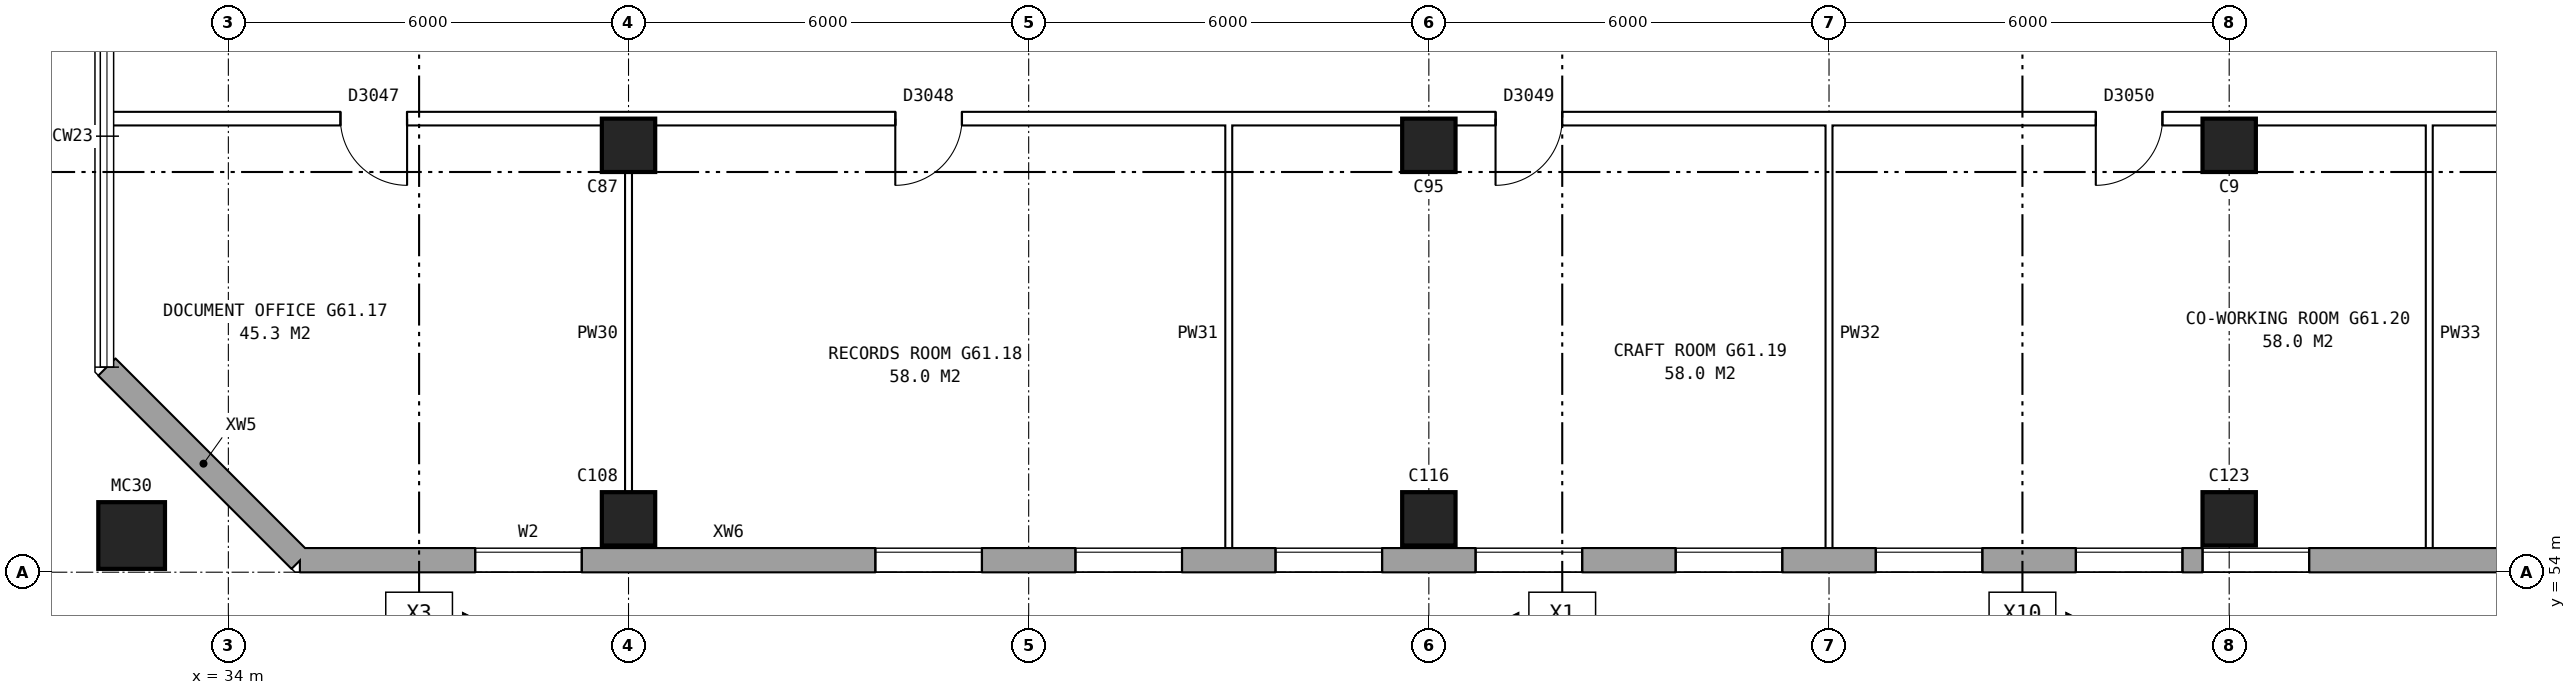
"""IFC4 building model, lengths in metres.
Left out: names, types, materials, properties, quantities, classifications, styles, units other than length and angle.
Written with IfcOpenShell. Run it as: python <this file> out.ifc"""

import sys

from ifc_helpers import new_model, si_unit, direction, frame, frame_2d, origin, origin_2d, place, context, subcontext, project, spatial, rectangle, hollow_rectangle, extrude, element, fill, save


model = new_model("IFC4")
c1 = context("Model", 3, precision=1e-05, world=origin(), true_north=direction((0.0, 1.0)))
c2 = subcontext(c1, "Body", "Model", "MODEL_VIEW")
j1 = project(units=[si_unit("LENGTHUNIT", "METRE"), si_unit("PLANEANGLEUNIT", "RADIAN")], contexts=[c1])
p1 = place(None, origin())
s1 = spatial("IfcSite", under=j1, at=p1, CompositionType="ELEMENT")
p2 = place(p1, origin())
s2 = spatial("IfcBuilding", under=s1, at=p2, CompositionType="ELEMENT")
p3 = place(p2, frame((0.0, 0.0, 215.2)))
s3 = spatial("IfcBuildingStorey", under=s2, at=p3, CompositionType="ELEMENT", Elevation=215.2)
for number, where, z_axis, x_axis in (
    (1, (40.0, 54.8, 0.0), (0.0, 0.0, 1.0), (1.0, 0.0, 0.0)),
    (2, (40.0, 60.4, 0.0), (0.0, 0.0, 1.0), (1.0, 0.0, 0.0)),
    (3, (52.0, 54.8, 0.0), (0.0, 0.0, 1.0), (1.0, 0.0, 0.0)),
    (4, (52.0, 60.4, 0.0), (0.0, 0.0, 1.0), (1.0, 0.0, 0.0)),
    (5, (64.0, 54.8, 0.0), (0.0, 0.0, 1.0), (1.0, 0.0, 0.0)),
    (6, (64.0, 60.4, 0.0), (0.0, 0.0, 1.0), (1.0, 0.0, 0.0)),
):
    element("IfcColumn", number, at=place(p3, frame(where, z_axis=z_axis, x_axis=x_axis)), inside=s3, PredefinedType="COLUMN", context=c2, shape_type="SweptSolid", body=[
        extrude(rectangle(XDim=0.8, YDim=0.8, at=origin_2d()), origin(), (0.0, 0.0, 1.0), 5.6),
    ])
p4 = place(p3, frame((32.55, 54.55, 0.0), z_axis=(0.0, 0.0, 1.0), x_axis=(1.0, 0.0, 0.0)))
e7 = element("IfcColumn", 7, at=p4, inside=s3, PredefinedType="COLUMN", context=c2, shape_type="SweptSolid", body=[
    extrude(hollow_rectangle(XDim=1.0, YDim=1.0, WallThickness=0.055, at=origin_2d()), origin(), (0.0, 0.0, 1.0), 6.2),
])
p5 = place(p3, frame((32.18, 57.075, 0.0), z_axis=(0.0, 0.0, 1.0), x_axis=(0.707106781187, -0.707106781187, 0.0)))
e8 = element("IfcWall", 8, at=p5, inside=s3, PredefinedType="STANDARD", context=c2, shape_type="SweptSolid", body=[
    extrude(rectangle(XDim=4.094, YDim=0.36, at=frame_2d((2.047, 0.0))), origin(), (0.0, 0.0, 1.0), 5.6),
])
p6 = place(p3, frame((35.075, 54.18, 0.0), z_axis=(0.0, 0.0, 1.0), x_axis=(1.0, 0.0, 0.0)))
e9 = element("IfcWall", 9, at=p6, inside=s3, PredefinedType="STANDARD", context=c2, shape_type="SweptSolid", body=[
    extrude(rectangle(XDim=39.875, YDim=0.36, at=frame_2d((19.938, 0.0))), origin(), (0.0, 0.0, 1.0), 5.6),
])
p7 = place(p6, frame((2.625, 0.0, 0.15)))
e10 = element("IfcOpeningElement", 10, at=p7, cuts=e9, PredefinedType="OPENING", context=c2, shape_type="SweptSolid", body=[
    extrude(rectangle(XDim=1.6, YDim=2.4, at=frame_2d((0.8, 1.2))), frame((0.0, 0.19, 0.0), z_axis=(0.0, -1.0, 0.0), x_axis=(1.0, 0.0, 0.0)), (0.0, 0.0, 1.0), 0.38),
])
p8 = place(p6, frame((8.625, 0.0, 0.15)))
e11 = element("IfcOpeningElement", 11, at=p8, cuts=e9, PredefinedType="OPENING", context=c2, shape_type="SweptSolid", body=[
    extrude(rectangle(XDim=1.6, YDim=2.4, at=frame_2d((0.8, 1.2))), frame((0.0, 0.19, 0.0), z_axis=(0.0, -1.0, 0.0), x_axis=(1.0, 0.0, 0.0)), (0.0, 0.0, 1.0), 0.38),
])
p9 = place(p6, frame((11.625, 0.0, 0.15)))
e12 = element("IfcOpeningElement", 12, at=p9, cuts=e9, PredefinedType="OPENING", context=c2, shape_type="SweptSolid", body=[
    extrude(rectangle(XDim=1.6, YDim=2.4, at=frame_2d((0.8, 1.2))), frame((0.0, 0.19, 0.0), z_axis=(0.0, -1.0, 0.0), x_axis=(1.0, 0.0, 0.0)), (0.0, 0.0, 1.0), 0.38),
])
p10 = place(p6, frame((14.625, 0.0, 0.15)))
e13 = element("IfcOpeningElement", 13, at=p10, cuts=e9, PredefinedType="OPENING", context=c2, shape_type="SweptSolid", body=[
    extrude(rectangle(XDim=1.6, YDim=2.4, at=frame_2d((0.8, 1.2))), frame((0.0, 0.19, 0.0), z_axis=(0.0, -1.0, 0.0), x_axis=(1.0, 0.0, 0.0)), (0.0, 0.0, 1.0), 0.38),
])
p11 = place(p6, frame((17.625, 0.0, 0.15)))
e14 = element("IfcOpeningElement", 14, at=p11, cuts=e9, PredefinedType="OPENING", context=c2, shape_type="SweptSolid", body=[
    extrude(rectangle(XDim=1.6, YDim=2.4, at=frame_2d((0.8, 1.2))), frame((0.0, 0.19, 0.0), z_axis=(0.0, -1.0, 0.0), x_axis=(1.0, 0.0, 0.0)), (0.0, 0.0, 1.0), 0.38),
])
p12 = place(p6, frame((20.625, 0.0, 0.15)))
e15 = element("IfcOpeningElement", 15, at=p12, cuts=e9, PredefinedType="OPENING", context=c2, shape_type="SweptSolid", body=[
    extrude(rectangle(XDim=1.6, YDim=2.4, at=frame_2d((0.8, 1.2))), frame((0.0, 0.19, 0.0), z_axis=(0.0, -1.0, 0.0), x_axis=(1.0, 0.0, 0.0)), (0.0, 0.0, 1.0), 0.38),
])
p13 = place(p6, frame((23.625, 0.0, 0.15)))
e16 = element("IfcOpeningElement", 16, at=p13, cuts=e9, PredefinedType="OPENING", context=c2, shape_type="SweptSolid", body=[
    extrude(rectangle(XDim=1.6, YDim=2.4, at=frame_2d((0.8, 1.2))), frame((0.0, 0.19, 0.0), z_axis=(0.0, -1.0, 0.0), x_axis=(1.0, 0.0, 0.0)), (0.0, 0.0, 1.0), 0.38),
])
p14 = place(p6, frame((26.625, 0.0, 0.15)))
e17 = element("IfcOpeningElement", 17, at=p14, cuts=e9, PredefinedType="OPENING", context=c2, shape_type="SweptSolid", body=[
    extrude(rectangle(XDim=1.6, YDim=2.4, at=frame_2d((0.8, 1.2))), frame((0.0, 0.19, 0.0), z_axis=(0.0, -1.0, 0.0), x_axis=(1.0, 0.0, 0.0)), (0.0, 0.0, 1.0), 0.38),
])
p15 = place(p6, frame((28.525, 0.0, 0.15)))
e18 = element("IfcOpeningElement", 18, at=p15, cuts=e9, PredefinedType="OPENING", context=c2, shape_type="SweptSolid", body=[
    extrude(rectangle(XDim=1.6, YDim=2.4, at=frame_2d((0.8, 1.2))), frame((0.0, 0.19, 0.0), z_axis=(0.0, -1.0, 0.0), x_axis=(1.0, 0.0, 0.0)), (0.0, 0.0, 1.0), 0.38),
])
p16 = place(p6, frame((32.975, 0.0, 0.15)))
e19 = element("IfcOpeningElement", 19, at=p16, cuts=e9, PredefinedType="OPENING", context=c2, shape_type="SweptSolid", body=[
    extrude(rectangle(XDim=0.9, YDim=2.4, at=frame_2d((0.45, 1.2))), frame((0.0, 0.19, 0.0), z_axis=(0.0, -1.0, 0.0), x_axis=(1.0, 0.0, 0.0)), (0.0, 0.0, 1.0), 0.38),
])
p17 = place(p6, frame((35.625, 0.0, 0.15)))
e20 = element("IfcOpeningElement", 20, at=p17, cuts=e9, PredefinedType="OPENING", context=c2, shape_type="SweptSolid", body=[
    extrude(rectangle(XDim=1.6, YDim=2.4, at=frame_2d((0.8, 1.2))), frame((0.0, 0.19, 0.0), z_axis=(0.0, -1.0, 0.0), x_axis=(1.0, 0.0, 0.0)), (0.0, 0.0, 1.0), 0.38),
])
p18 = place(p6, frame((34.175, 0.0, 0.15)))
e21 = element("IfcOpeningElement", 21, at=p18, cuts=e9, PredefinedType="OPENING", context=c2, shape_type="SweptSolid", body=[
    extrude(rectangle(XDim=0.9, YDim=2.4, at=frame_2d((0.45, 1.2))), frame((0.0, 0.19, 0.0), z_axis=(0.0, -1.0, 0.0), x_axis=(1.0, 0.0, 0.0)), (0.0, 0.0, 1.0), 0.38),
])
p19 = place(p3, frame((32.24, 60.8, 0.0), z_axis=(0.0, 0.0, 1.0), x_axis=(1.0, 0.0, 0.0)))
e22 = element("IfcWall", 22, at=p19, inside=s3, PredefinedType="PARTITIONING", context=c2, shape_type="SweptSolid", body=[
    extrude(rectangle(XDim=136.52, YDim=0.2, at=frame_2d((68.26, 0.0))), origin(), (0.0, 0.0, 1.0), 5.6),
])
p20 = place(p19, frame((3.44, 0.0, 0.0)))
e23 = element("IfcOpeningElement", 23, at=p20, cuts=e22, PredefinedType="OPENING", context=c2, shape_type="SweptSolid", body=[
    extrude(rectangle(XDim=1.0, YDim=2.1, at=frame_2d((0.5, 1.05))), frame((0.0, 0.11, 0.0), z_axis=(0.0, -1.0, 0.0), x_axis=(1.0, 0.0, 0.0)), (0.0, 0.0, 1.0), 0.22),
])
p21 = place(p19, frame((11.76, 0.0, 0.0)))
e24 = element("IfcOpeningElement", 24, at=p21, cuts=e22, PredefinedType="OPENING", context=c2, shape_type="SweptSolid", body=[
    extrude(rectangle(XDim=1.0, YDim=2.1, at=frame_2d((0.5, 1.05))), frame((0.0, 0.11, 0.0), z_axis=(0.0, -1.0, 0.0), x_axis=(1.0, 0.0, 0.0)), (0.0, 0.0, 1.0), 0.22),
])
p22 = place(p19, frame((20.76, 0.0, 0.0)))
e25 = element("IfcOpeningElement", 25, at=p22, cuts=e22, PredefinedType="OPENING", context=c2, shape_type="SweptSolid", body=[
    extrude(rectangle(XDim=1.0, YDim=2.1, at=frame_2d((0.5, 1.05))), frame((0.0, 0.11, 0.0), z_axis=(0.0, -1.0, 0.0), x_axis=(1.0, 0.0, 0.0)), (0.0, 0.0, 1.0), 0.22),
])
p23 = place(p19, frame((29.76, 0.0, 0.0)))
e26 = element("IfcOpeningElement", 26, at=p23, cuts=e22, PredefinedType="OPENING", context=c2, shape_type="SweptSolid", body=[
    extrude(rectangle(XDim=1.0, YDim=2.1, at=frame_2d((0.5, 1.05))), frame((0.0, 0.11, 0.0), z_axis=(0.0, -1.0, 0.0), x_axis=(1.0, 0.0, 0.0)), (0.0, 0.0, 1.0), 0.22),
])
p24 = place(p19, frame((38.58, 0.0, 0.0)))
e27 = element("IfcOpeningElement", 27, at=p24, cuts=e22, PredefinedType="OPENING", context=c2, shape_type="SweptSolid", body=[
    extrude(rectangle(XDim=1.0, YDim=2.1, at=frame_2d((0.5, 1.05))), frame((0.0, 0.11, 0.0), z_axis=(0.0, -1.0, 0.0), x_axis=(1.0, 0.0, 0.0)), (0.0, 0.0, 1.0), 0.22),
])
p25 = place(p19, frame((49.955, 0.0, 0.0)))
e28 = element("IfcOpeningElement", 28, at=p25, cuts=e22, PredefinedType="OPENING", context=c2, shape_type="SweptSolid", body=[
    extrude(rectangle(XDim=1.0, YDim=2.1, at=frame_2d((0.5, 1.05))), frame((0.0, 0.11, 0.0), z_axis=(0.0, -1.0, 0.0), x_axis=(1.0, 0.0, 0.0)), (0.0, 0.0, 1.0), 0.22),
])
p26 = place(p19, frame((63.885, 0.0, 0.0)))
e29 = element("IfcOpeningElement", 29, at=p26, cuts=e22, PredefinedType="OPENING", context=c2, shape_type="SweptSolid", body=[
    extrude(rectangle(XDim=1.0, YDim=2.1, at=frame_2d((0.5, 1.05))), frame((0.0, 0.11, 0.0), z_axis=(0.0, -1.0, 0.0), x_axis=(1.0, 0.0, 0.0)), (0.0, 0.0, 1.0), 0.22),
])
p27 = place(p19, frame((77.635, 0.0, 0.0)))
e30 = element("IfcOpeningElement", 30, at=p27, cuts=e22, PredefinedType="OPENING", context=c2, shape_type="SweptSolid", body=[
    extrude(rectangle(XDim=1.0, YDim=2.1, at=frame_2d((0.5, 1.05))), frame((0.0, 0.11, 0.0), z_axis=(0.0, -1.0, 0.0), x_axis=(1.0, 0.0, 0.0)), (0.0, 0.0, 1.0), 0.22),
])
p28 = place(p19, frame((91.565, 0.0, 0.0)))
e31 = element("IfcOpeningElement", 31, at=p28, cuts=e22, PredefinedType="OPENING", context=c2, shape_type="SweptSolid", body=[
    extrude(rectangle(XDim=1.0, YDim=2.1, at=frame_2d((0.5, 1.05))), frame((0.0, 0.11, 0.0), z_axis=(0.0, -1.0, 0.0), x_axis=(1.0, 0.0, 0.0)), (0.0, 0.0, 1.0), 0.22),
])
p29 = place(p19, frame((101.44, 0.0, 0.0)))
e32 = element("IfcOpeningElement", 32, at=p29, cuts=e22, PredefinedType="OPENING", context=c2, shape_type="SweptSolid", body=[
    extrude(rectangle(XDim=1.0, YDim=2.1, at=frame_2d((0.5, 1.05))), frame((0.0, 0.11, 0.0), z_axis=(0.0, -1.0, 0.0), x_axis=(1.0, 0.0, 0.0)), (0.0, 0.0, 1.0), 0.22),
])
p30 = place(p19, frame((108.76, 0.0, 0.0)))
e33 = element("IfcOpeningElement", 33, at=p30, cuts=e22, PredefinedType="OPENING", context=c2, shape_type="SweptSolid", body=[
    extrude(rectangle(XDim=1.0, YDim=2.1, at=frame_2d((0.5, 1.05))), frame((0.0, 0.11, 0.0), z_axis=(0.0, -1.0, 0.0), x_axis=(1.0, 0.0, 0.0)), (0.0, 0.0, 1.0), 0.22),
])
p31 = place(p19, frame((117.76, 0.0, 0.0)))
e34 = element("IfcOpeningElement", 34, at=p31, cuts=e22, PredefinedType="OPENING", context=c2, shape_type="SweptSolid", body=[
    extrude(rectangle(XDim=1.0, YDim=2.1, at=frame_2d((0.5, 1.05))), frame((0.0, 0.11, 0.0), z_axis=(0.0, -1.0, 0.0), x_axis=(1.0, 0.0, 0.0)), (0.0, 0.0, 1.0), 0.22),
])
p32 = place(p19, frame((125.26, 0.0, 0.0)))
e35 = element("IfcOpeningElement", 35, at=p32, cuts=e22, PredefinedType="OPENING", context=c2, shape_type="SweptSolid", body=[
    extrude(rectangle(XDim=1.0, YDim=2.1, at=frame_2d((0.5, 1.05))), frame((0.0, 0.11, 0.0), z_axis=(0.0, -1.0, 0.0), x_axis=(1.0, 0.0, 0.0)), (0.0, 0.0, 1.0), 0.22),
])
p33 = place(p19, frame((132.08, 0.0, 0.0)))
e36 = element("IfcOpeningElement", 36, at=p33, cuts=e22, PredefinedType="OPENING", context=c2, shape_type="SweptSolid", body=[
    extrude(rectangle(XDim=1.0, YDim=2.1, at=frame_2d((0.5, 1.05))), frame((0.0, 0.11, 0.0), z_axis=(0.0, -1.0, 0.0), x_axis=(1.0, 0.0, 0.0)), (0.0, 0.0, 1.0), 0.22),
])
for number, where, z_axis, x_axis in (
    (37, (40.0, 54.24, 0.0), (0.0, 0.0, 1.0), (0.0, 1.0, 0.0)),
    (38, (49.0, 54.24, 0.0), (0.0, 0.0, 1.0), (0.0, 1.0, 0.0)),
    (39, (58.0, 54.24, 0.0), (0.0, 0.0, 1.0), (0.0, 1.0, 0.0)),
    (40, (67.0, 54.24, 0.0), (0.0, 0.0, 1.0), (0.0, 1.0, 0.0)),
):
    element("IfcWall", number, at=place(p3, frame(where, z_axis=z_axis, x_axis=x_axis)), inside=s3, PredefinedType="PARTITIONING", context=c2, shape_type="SweptSolid", body=[
        extrude(rectangle(XDim=6.66, YDim=0.1, at=frame_2d((3.33, 0.0))), origin(), (0.0, 0.0, 1.0), 5.6),
    ])
p34 = place(p7, origin())
e41 = element("IfcWindow", 41, at=p34, inside=s3, PartitioningType="SINGLE_PANEL", PredefinedType="WINDOW", context=c2, shape_type="SweptSolid", body=[
    extrude(rectangle(XDim=1.6, YDim=2.4, at=frame_2d((0.8, 1.2))), frame((0.0, 0.15, 0.0), z_axis=(0.0, -1.0, 0.0), x_axis=(1.0, 0.0, 0.0)), (0.0, 0.0, 1.0), 0.06),
])
fill(e10, e41)
p35 = place(p8, origin())
e42 = element("IfcWindow", 42, at=p35, inside=s3, PartitioningType="SINGLE_PANEL", PredefinedType="WINDOW", context=c2, shape_type="SweptSolid", body=[
    extrude(rectangle(XDim=1.6, YDim=2.4, at=frame_2d((0.8, 1.2))), frame((0.0, 0.15, 0.0), z_axis=(0.0, -1.0, 0.0), x_axis=(1.0, 0.0, 0.0)), (0.0, 0.0, 1.0), 0.06),
])
fill(e11, e42)
p36 = place(p9, origin())
e43 = element("IfcWindow", 43, at=p36, inside=s3, PartitioningType="SINGLE_PANEL", PredefinedType="WINDOW", context=c2, shape_type="SweptSolid", body=[
    extrude(rectangle(XDim=1.6, YDim=2.4, at=frame_2d((0.8, 1.2))), frame((0.0, 0.15, 0.0), z_axis=(0.0, -1.0, 0.0), x_axis=(1.0, 0.0, 0.0)), (0.0, 0.0, 1.0), 0.06),
])
fill(e12, e43)
p37 = place(p10, origin())
e44 = element("IfcWindow", 44, at=p37, inside=s3, PartitioningType="SINGLE_PANEL", PredefinedType="WINDOW", context=c2, shape_type="SweptSolid", body=[
    extrude(rectangle(XDim=1.6, YDim=2.4, at=frame_2d((0.8, 1.2))), frame((0.0, 0.15, 0.0), z_axis=(0.0, -1.0, 0.0), x_axis=(1.0, 0.0, 0.0)), (0.0, 0.0, 1.0), 0.06),
])
fill(e13, e44)
p38 = place(p11, origin())
e45 = element("IfcWindow", 45, at=p38, inside=s3, PartitioningType="SINGLE_PANEL", PredefinedType="WINDOW", context=c2, shape_type="SweptSolid", body=[
    extrude(rectangle(XDim=1.6, YDim=2.4, at=frame_2d((0.8, 1.2))), frame((0.0, 0.15, 0.0), z_axis=(0.0, -1.0, 0.0), x_axis=(1.0, 0.0, 0.0)), (0.0, 0.0, 1.0), 0.06),
])
fill(e14, e45)
p39 = place(p12, origin())
e46 = element("IfcWindow", 46, at=p39, inside=s3, PartitioningType="SINGLE_PANEL", PredefinedType="WINDOW", context=c2, shape_type="SweptSolid", body=[
    extrude(rectangle(XDim=1.6, YDim=2.4, at=frame_2d((0.8, 1.2))), frame((0.0, 0.15, 0.0), z_axis=(0.0, -1.0, 0.0), x_axis=(1.0, 0.0, 0.0)), (0.0, 0.0, 1.0), 0.06),
])
fill(e15, e46)
p40 = place(p13, origin())
e47 = element("IfcWindow", 47, at=p40, inside=s3, PartitioningType="SINGLE_PANEL", PredefinedType="WINDOW", context=c2, shape_type="SweptSolid", body=[
    extrude(rectangle(XDim=1.6, YDim=2.4, at=frame_2d((0.8, 1.2))), frame((0.0, 0.15, 0.0), z_axis=(0.0, -1.0, 0.0), x_axis=(1.0, 0.0, 0.0)), (0.0, 0.0, 1.0), 0.06),
])
fill(e16, e47)
p41 = place(p14, origin())
e48 = element("IfcWindow", 48, at=p41, inside=s3, PartitioningType="SINGLE_PANEL", PredefinedType="WINDOW", context=c2, shape_type="SweptSolid", body=[
    extrude(rectangle(XDim=1.6, YDim=2.4, at=frame_2d((0.8, 1.2))), frame((0.0, 0.15, 0.0), z_axis=(0.0, -1.0, 0.0), x_axis=(1.0, 0.0, 0.0)), (0.0, 0.0, 1.0), 0.06),
])
fill(e17, e48)
p42 = place(p15, origin())
e49 = element("IfcWindow", 49, at=p42, inside=s3, PartitioningType="SINGLE_PANEL", PredefinedType="WINDOW", context=c2, shape_type="SweptSolid", body=[
    extrude(rectangle(XDim=1.6, YDim=2.4, at=frame_2d((0.8, 1.2))), frame((0.0, 0.15, 0.0), z_axis=(0.0, -1.0, 0.0), x_axis=(1.0, 0.0, 0.0)), (0.0, 0.0, 1.0), 0.06),
])
fill(e18, e49)
p43 = place(p20, frame((1.0, 0.0, 0.0), z_axis=(0.0, 0.0, 1.0), x_axis=(-1.0, 0.0, 0.0)))
e50 = element("IfcDoor", 50, at=p43, inside=s3, OperationType="SINGLE_SWING_LEFT", PredefinedType="DOOR", context=c2, shape_type="SweptSolid", body=[
    extrude(rectangle(XDim=1.0, YDim=2.1, at=frame_2d((0.5, 1.05))), frame((0.0, 0.025, 0.0), z_axis=(0.0, -1.0, 0.0), x_axis=(1.0, 0.0, 0.0)), (0.0, 0.0, 1.0), 0.05),
])
fill(e23, e50)
p44 = place(p21, frame((1.0, 0.0, 0.0), z_axis=(0.0, 0.0, 1.0), x_axis=(-1.0, 0.0, 0.0)))
e51 = element("IfcDoor", 51, at=p44, inside=s3, OperationType="SINGLE_SWING_RIGHT", PredefinedType="DOOR", context=c2, shape_type="SweptSolid", body=[
    extrude(rectangle(XDim=1.0, YDim=2.1, at=frame_2d((0.5, 1.05))), frame((0.0, 0.025, 0.0), z_axis=(0.0, -1.0, 0.0), x_axis=(1.0, 0.0, 0.0)), (0.0, 0.0, 1.0), 0.05),
])
fill(e24, e51)
p45 = place(p22, frame((1.0, 0.0, 0.0), z_axis=(0.0, 0.0, 1.0), x_axis=(-1.0, 0.0, 0.0)))
e52 = element("IfcDoor", 52, at=p45, inside=s3, OperationType="SINGLE_SWING_RIGHT", PredefinedType="DOOR", context=c2, shape_type="SweptSolid", body=[
    extrude(rectangle(XDim=1.0, YDim=2.1, at=frame_2d((0.5, 1.05))), frame((0.0, 0.025, 0.0), z_axis=(0.0, -1.0, 0.0), x_axis=(1.0, 0.0, 0.0)), (0.0, 0.0, 1.0), 0.05),
])
fill(e25, e52)
p46 = place(p23, frame((1.0, 0.0, 0.0), z_axis=(0.0, 0.0, 1.0), x_axis=(-1.0, 0.0, 0.0)))
e53 = element("IfcDoor", 53, at=p46, inside=s3, OperationType="SINGLE_SWING_RIGHT", PredefinedType="DOOR", context=c2, shape_type="SweptSolid", body=[
    extrude(rectangle(XDim=1.0, YDim=2.1, at=frame_2d((0.5, 1.05))), frame((0.0, 0.025, 0.0), z_axis=(0.0, -1.0, 0.0), x_axis=(1.0, 0.0, 0.0)), (0.0, 0.0, 1.0), 0.05),
])
fill(e26, e53)
save(model, sys.argv[1])
